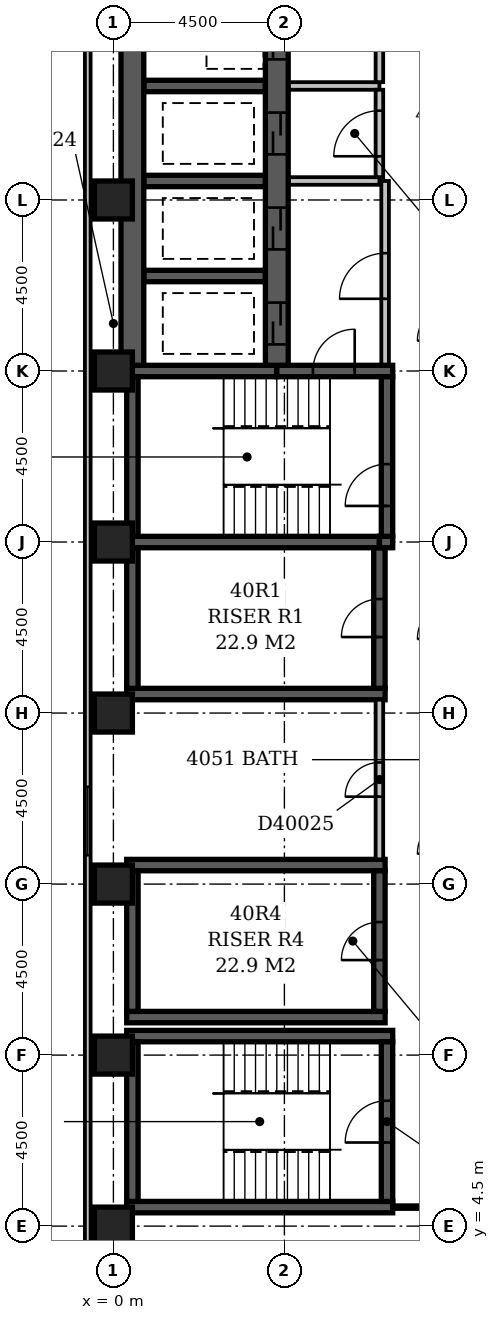
"""IFC4 building model, lengths in metres.
Left out: names, types, materials, properties, quantities, classifications, styles, units other than length and angle.
Written with IfcOpenShell. Run it as: python <this file> out.ifc"""

import sys

from ifc_helpers import new_model, si_unit, direction, frame, frame_2d, origin, origin_2d, place, context, subcontext, project, spatial, rectangle, extrude, element, fill, save


model = new_model("IFC4")
c1 = context("Model", 3, precision=1e-05, world=origin(), true_north=direction((0.0, 1.0)))
c2 = subcontext(c1, "Body", "Model", "MODEL_VIEW")
j1 = project(units=[si_unit("LENGTHUNIT", "METRE"), si_unit("PLANEANGLEUNIT", "RADIAN")], contexts=[c1])
p1 = place(None, origin())
s1 = spatial("IfcSite", under=j1, at=p1, CompositionType="ELEMENT")
p2 = place(p1, origin())
s2 = spatial("IfcBuilding", under=s1, at=p2, CompositionType="ELEMENT")
p3 = place(p2, frame((0.0, 0.0, 159.2)))
s3 = spatial("IfcBuildingStorey", under=s2, at=p3, CompositionType="ELEMENT", Elevation=159.2)
for number, where, z_axis, x_axis in (
    (1, (0.35, 5.0, -0.3), (0.0, 0.0, 1.0), (1.0, 0.0, 0.0)),
    (2, (0.35, 9.5, -0.3), (0.0, 0.0, 1.0), (1.0, 0.0, 0.0)),
):
    element("IfcWall", number, at=place(p3, frame(where, z_axis=z_axis, x_axis=x_axis)), inside=s3, PredefinedType="SHEAR", context=c2, shape_type="SweptSolid", body=[
        extrude(rectangle(XDim=7.0, YDim=0.3, at=frame_2d((3.5, 0.0))), origin(), (0.0, 0.0, 1.0), 3.6),
    ])
for number, where, z_axis, x_axis in (
    (3, (0.35, 10.0, -0.3), (0.0, 0.0, 1.0), (1.0, 0.0, 0.0)),
    (4, (0.35, 14.0, -0.3), (0.0, 0.0, 1.0), (1.0, 0.0, 0.0)),
    (5, (0.35, 18.5, -0.3), (0.0, 0.0, 1.0), (1.0, 0.0, 0.0)),
):
    element("IfcWall", number, at=place(p3, frame(where, z_axis=z_axis, x_axis=x_axis)), inside=s3, PredefinedType="SHEAR", context=c2, shape_type="SweptSolid", body=[
        extrude(rectangle(XDim=6.8, YDim=0.3, at=frame_2d((3.4, 0.0))), origin(), (0.0, 0.0, 1.0), 3.6),
    ])
p4 = place(p3, frame((0.35, 22.5, -0.3), z_axis=(0.0, 0.0, 1.0), x_axis=(1.0, 0.0, 0.0)))
e6 = element("IfcWall", 6, at=p4, inside=s3, PredefinedType="SHEAR", context=c2, shape_type="SweptSolid", body=[
    extrude(rectangle(XDim=6.65, YDim=0.3, at=frame_2d((3.325, 0.0))), origin(), (0.0, 0.0, 1.0), 3.6),
])
p5 = place(p3, frame((0.35, 27.0, -0.3), z_axis=(0.0, 0.0, 1.0), x_axis=(1.0, 0.0, 0.0)))
e7 = element("IfcWall", 7, at=p5, inside=s3, PredefinedType="SHEAR", context=c2, shape_type="SweptSolid", body=[
    extrude(rectangle(XDim=3.95, YDim=0.3, at=frame_2d((1.975, 0.0))), origin(), (0.0, 0.0, 1.0), 3.6),
])
p6 = place(p3, frame((0.5, 5.15, -0.3), z_axis=(0.0, 0.0, 1.0), x_axis=(0.0, 1.0, 0.0)))
e8 = element("IfcWall", 8, at=p6, inside=s3, PredefinedType="SHEAR", context=c2, shape_type="SweptSolid", body=[
    extrude(rectangle(XDim=4.2, YDim=0.3, at=frame_2d((2.1, 0.0))), origin(), (0.0, 0.0, 1.0), 3.6),
])
for number, where, z_axis, x_axis in (
    (9, (0.5, 10.15, -0.3), (0.0, 0.0, 1.0), (0.0, 1.0, 0.0)),
    (10, (0.5, 18.65, -0.3), (0.0, 0.0, 1.0), (0.0, 1.0, 0.0)),
):
    element("IfcWall", number, at=place(p3, frame(where, z_axis=z_axis, x_axis=x_axis)), inside=s3, PredefinedType="SHEAR", context=c2, shape_type="SweptSolid", body=[
        extrude(rectangle(XDim=3.7, YDim=0.3, at=frame_2d((1.85, 0.0))), origin(), (0.0, 0.0, 1.0), 3.6),
    ])
p7 = place(p3, frame((0.5, 22.65, -0.3), z_axis=(0.0, 0.0, 1.0), x_axis=(0.0, 1.0, 0.0)))
e11 = element("IfcWall", 11, at=p7, inside=s3, PredefinedType="SHEAR", context=c2, shape_type="SweptSolid", body=[
    extrude(rectangle(XDim=4.2, YDim=0.3, at=frame_2d((2.1, 0.0))), origin(), (0.0, 0.0, 1.0), 3.6),
])
p8 = place(p3, frame((0.5, 27.15, -0.3), z_axis=(0.0, 0.0, 1.0), x_axis=(0.0, 1.0, 0.0)))
e12 = element("IfcWall", 12, at=p8, inside=s3, PredefinedType="SHEAR", context=c2, shape_type="SweptSolid", body=[
    extrude(rectangle(XDim=22.05, YDim=0.6, at=frame_2d((11.025, 0.0))), origin(), (0.0, 0.0, 1.0), 3.6),
])
for number, where, z_axis, x_axis in (
    (13, (0.8, 29.5, -0.3), (0.0, 0.0, 1.0), (1.0, 0.0, 0.0)),
    (14, (0.8, 32.0, -0.3), (0.0, 0.0, 1.0), (1.0, 0.0, 0.0)),
    (15, (0.8, 34.5, -0.3), (0.0, 0.0, 1.0), (1.0, 0.0, 0.0)),
):
    element("IfcWall", number, at=place(p3, frame(where, z_axis=z_axis, x_axis=x_axis)), inside=s3, PredefinedType="SHEAR", context=c2, shape_type="SweptSolid", body=[
        extrude(rectangle(XDim=3.2, YDim=0.3, at=frame_2d((1.6, 0.0))), origin(), (0.0, 0.0, 1.0), 3.6),
    ])
p9 = place(p3, frame((4.3, 27.0, -0.3), z_axis=(0.0, 0.0, 1.0), x_axis=(1.0, 0.0, 0.0)))
e16 = element("IfcWall", 16, at=p9, inside=s3, PredefinedType="SHEAR", context=c2, shape_type="SweptSolid", body=[
    extrude(rectangle(XDim=3.05, YDim=0.3, at=frame_2d((1.525, 0.0))), origin(), (0.0, 0.0, 1.0), 3.6),
])
p10 = place(p9, frame((0.95, 0.0, 0.3)))
e17 = element("IfcOpeningElement", 17, at=p10, cuts=e16, PredefinedType="OPENING", context=c2, shape_type="SweptSolid", body=[
    extrude(rectangle(XDim=1.1, YDim=2.1, at=frame_2d((0.55, 1.05))), frame((0.0, 0.162, 0.0), z_axis=(0.0, -1.0, 0.0), x_axis=(1.0, 0.0, 0.0)), (0.0, 0.0, 1.0), 0.324),
])
p11 = place(p3, frame((4.3, 27.15, -0.3), z_axis=(0.0, 0.0, 1.0), x_axis=(0.0, 1.0, 0.0)))
e18 = element("IfcWall", 18, at=p11, inside=s3, PredefinedType="SHEAR", context=c2, shape_type="SweptSolid", body=[
    extrude(rectangle(XDim=22.05, YDim=0.6, at=frame_2d((11.025, 0.0))), origin(), (0.0, 0.0, 1.0), 3.6),
])
p12 = place(p11, frame((3.05, 0.0, 0.3)))
e19 = element("IfcOpeningElement", 19, at=p12, cuts=e18, PredefinedType="OPENING", context=c2, shape_type="SweptSolid", body=[
    extrude(rectangle(XDim=1.1, YDim=2.1, at=frame_2d((0.55, 1.05))), frame((0.0, 0.312, 0.0), z_axis=(0.0, -1.0, 0.0), x_axis=(1.0, 0.0, 0.0)), (0.0, 0.0, 1.0), 0.624),
])
p13 = place(p11, frame((0.55, 0.0, 0.3)))
e20 = element("IfcOpeningElement", 20, at=p13, cuts=e18, PredefinedType="OPENING", context=c2, shape_type="SweptSolid", body=[
    extrude(rectangle(XDim=1.1, YDim=2.1, at=frame_2d((0.55, 1.05))), frame((0.0, 0.312, 0.0), z_axis=(0.0, -1.0, 0.0), x_axis=(1.0, 0.0, 0.0)), (0.0, 0.0, 1.0), 0.624),
])
p14 = place(p11, frame((20.55, 0.0, 0.3)))
e21 = element("IfcOpeningElement", 21, at=p14, cuts=e18, PredefinedType="OPENING", context=c2, shape_type="SweptSolid", body=[
    extrude(rectangle(XDim=1.1, YDim=2.1, at=frame_2d((0.55, 1.05))), frame((0.0, 0.312, 0.0), z_axis=(0.0, -1.0, 0.0), x_axis=(1.0, 0.0, 0.0)), (0.0, 0.0, 1.0), 0.624),
])
p15 = place(p11, frame((18.05, 0.0, 0.3)))
e22 = element("IfcOpeningElement", 22, at=p15, cuts=e18, PredefinedType="OPENING", context=c2, shape_type="SweptSolid", body=[
    extrude(rectangle(XDim=1.1, YDim=2.1, at=frame_2d((0.55, 1.05))), frame((0.0, 0.312, 0.0), z_axis=(0.0, -1.0, 0.0), x_axis=(1.0, 0.0, 0.0)), (0.0, 0.0, 1.0), 0.624),
])
p16 = place(p11, frame((15.55, 0.0, 0.3)))
e23 = element("IfcOpeningElement", 23, at=p16, cuts=e18, PredefinedType="OPENING", context=c2, shape_type="SweptSolid", body=[
    extrude(rectangle(XDim=1.1, YDim=2.1, at=frame_2d((0.55, 1.05))), frame((0.0, 0.312, 0.0), z_axis=(0.0, -1.0, 0.0), x_axis=(1.0, 0.0, 0.0)), (0.0, 0.0, 1.0), 0.624),
])
p17 = place(p11, frame((13.05, 0.0, 0.3)))
e24 = element("IfcOpeningElement", 24, at=p17, cuts=e18, PredefinedType="OPENING", context=c2, shape_type="SweptSolid", body=[
    extrude(rectangle(XDim=1.1, YDim=2.1, at=frame_2d((0.55, 1.05))), frame((0.0, 0.312, 0.0), z_axis=(0.0, -1.0, 0.0), x_axis=(1.0, 0.0, 0.0)), (0.0, 0.0, 1.0), 0.624),
])
p18 = place(p11, frame((10.55, 0.0, 0.3)))
e25 = element("IfcOpeningElement", 25, at=p18, cuts=e18, PredefinedType="OPENING", context=c2, shape_type="SweptSolid", body=[
    extrude(rectangle(XDim=1.1, YDim=2.1, at=frame_2d((0.55, 1.05))), frame((0.0, 0.312, 0.0), z_axis=(0.0, -1.0, 0.0), x_axis=(1.0, 0.0, 0.0)), (0.0, 0.0, 1.0), 0.624),
])
p19 = place(p11, frame((8.05, 0.0, 0.3)))
e26 = element("IfcOpeningElement", 26, at=p19, cuts=e18, PredefinedType="OPENING", context=c2, shape_type="SweptSolid", body=[
    extrude(rectangle(XDim=1.1, YDim=2.1, at=frame_2d((0.55, 1.05))), frame((0.0, 0.312, 0.0), z_axis=(0.0, -1.0, 0.0), x_axis=(1.0, 0.0, 0.0)), (0.0, 0.0, 1.0), 0.624),
])
p20 = place(p11, frame((5.55, 0.0, 0.3)))
e27 = element("IfcOpeningElement", 27, at=p20, cuts=e18, PredefinedType="OPENING", context=c2, shape_type="SweptSolid", body=[
    extrude(rectangle(XDim=1.1, YDim=2.1, at=frame_2d((0.55, 1.05))), frame((0.0, 0.312, 0.0), z_axis=(0.0, -1.0, 0.0), x_axis=(1.0, 0.0, 0.0)), (0.0, 0.0, 1.0), 0.624),
])
p21 = place(p3, frame((7.0, 10.15, -0.3), z_axis=(0.0, 0.0, 1.0), x_axis=(0.0, 1.0, 0.0)))
e28 = element("IfcWall", 28, at=p21, inside=s3, PredefinedType="SHEAR", context=c2, shape_type="SweptSolid", body=[
    extrude(rectangle(XDim=3.7, YDim=0.3, at=frame_2d((1.85, 0.0))), origin(), (0.0, 0.0, 1.0), 3.6),
])
p22 = place(p21, frame((1.35, 0.0, 0.3)))
e29 = element("IfcOpeningElement", 29, at=p22, cuts=e28, PredefinedType="OPENING", context=c2, shape_type="SweptSolid", body=[
    extrude(rectangle(XDim=1.0, YDim=2.1, at=frame_2d((0.5, 1.05))), frame((0.0, 0.162, 0.0), z_axis=(0.0, -1.0, 0.0), x_axis=(1.0, 0.0, 0.0)), (0.0, 0.0, 1.0), 0.324),
])
p23 = place(p3, frame((7.0, 18.65, -0.3), z_axis=(0.0, 0.0, 1.0), x_axis=(0.0, 1.0, 0.0)))
e30 = element("IfcWall", 30, at=p23, inside=s3, PredefinedType="SHEAR", context=c2, shape_type="SweptSolid", body=[
    extrude(rectangle(XDim=3.7, YDim=0.3, at=frame_2d((1.85, 0.0))), origin(), (0.0, 0.0, 1.0), 3.6),
])
p24 = place(p23, frame((1.35, 0.0, 0.3)))
e31 = element("IfcOpeningElement", 31, at=p24, cuts=e30, PredefinedType="OPENING", context=c2, shape_type="SweptSolid", body=[
    extrude(rectangle(XDim=1.0, YDim=2.1, at=frame_2d((0.5, 1.05))), frame((0.0, 0.162, 0.0), z_axis=(0.0, -1.0, 0.0), x_axis=(1.0, 0.0, 0.0)), (0.0, 0.0, 1.0), 0.324),
])
p25 = place(p3, frame((7.0, 22.5, -0.3), z_axis=(0.0, 0.0, 1.0), x_axis=(1.0, 0.0, 0.0)))
e32 = element("IfcWall", 32, at=p25, inside=s3, PredefinedType="SHEAR", context=c2, shape_type="SweptSolid", body=[
    extrude(rectangle(XDim=0.35, YDim=0.3, at=frame_2d((0.175, 0.0))), origin(), (0.0, 0.0, 1.0), 3.6),
])
p26 = place(p3, frame((7.2, 5.15, -0.3), z_axis=(0.0, 0.0, 1.0), x_axis=(0.0, 1.0, 0.0)))
e33 = element("IfcWall", 33, at=p26, inside=s3, PredefinedType="SHEAR", context=c2, shape_type="SweptSolid", body=[
    extrude(rectangle(XDim=4.2, YDim=0.3, at=frame_2d((2.1, 0.0))), origin(), (0.0, 0.0, 1.0), 3.6),
])
p27 = place(p26, frame((1.55, 0.0, 0.3)))
e34 = element("IfcOpeningElement", 34, at=p27, cuts=e33, PredefinedType="OPENING", context=c2, shape_type="SweptSolid", body=[
    extrude(rectangle(XDim=1.1, YDim=2.1, at=frame_2d((0.55, 1.05))), frame((0.0, 0.162, 0.0), z_axis=(0.0, -1.0, 0.0), x_axis=(1.0, 0.0, 0.0)), (0.0, 0.0, 1.0), 0.324),
])
p28 = place(p3, frame((7.2, 22.65, -0.3), z_axis=(0.0, 0.0, 1.0), x_axis=(0.0, 1.0, 0.0)))
e35 = element("IfcWall", 35, at=p28, inside=s3, PredefinedType="SHEAR", context=c2, shape_type="SweptSolid", body=[
    extrude(rectangle(XDim=4.2, YDim=0.3, at=frame_2d((2.1, 0.0))), origin(), (0.0, 0.0, 1.0), 3.6),
])
p29 = place(p28, frame((0.8, 0.0, 0.3)))
e36 = element("IfcOpeningElement", 36, at=p29, cuts=e35, PredefinedType="OPENING", context=c2, shape_type="SweptSolid", body=[
    extrude(rectangle(XDim=1.1, YDim=2.1, at=frame_2d((0.55, 1.05))), frame((0.0, 0.162, 0.0), z_axis=(0.0, -1.0, 0.0), x_axis=(1.0, 0.0, 0.0)), (0.0, 0.0, 1.0), 0.324),
])
for number, where, z_axis, x_axis in (
    (37, (0.0, 4.5, -0.3), (0.0, 0.0, 1.0), (1.0, 0.0, 0.0)),
    (38, (0.0, 9.0, -0.3), (0.0, 0.0, 1.0), (1.0, 0.0, 0.0)),
    (39, (0.0, 13.5, -0.3), (0.0, 0.0, 1.0), (1.0, 0.0, 0.0)),
    (40, (0.0, 18.0, -0.3), (0.0, 0.0, 1.0), (1.0, 0.0, 0.0)),
    (41, (0.0, 22.5, -0.3), (0.0, 0.0, 1.0), (1.0, 0.0, 0.0)),
    (42, (0.0, 27.0, -0.3), (0.0, 0.0, 1.0), (1.0, 0.0, 0.0)),
    (43, (0.0, 31.5, -0.3), (0.0, 0.0, 1.0), (1.0, 0.0, 0.0)),
):
    element("IfcColumn", number, at=place(p3, frame(where, z_axis=z_axis, x_axis=x_axis)), inside=s3, PredefinedType="COLUMN", context=c2, shape_type="SweptSolid", body=[
        extrude(rectangle(XDim=1.0, YDim=1.0, at=origin_2d()), origin(), (0.0, 0.0, 1.0), 3.6),
    ])
p30 = place(p3, frame((-0.675, 59.1, 0.0), z_axis=(0.0, 0.0, 1.0), x_axis=(0.0, -1.0, 0.0)))
e44 = element("IfcWall", 44, at=p30, inside=s3, PredefinedType="STANDARD", context=c2, shape_type="SweptSolid", body=[
    extrude(rectangle(XDim=55.35, YDim=0.15, at=frame_2d((27.675, 0.0))), origin(), (0.0, 0.0, 1.0), 2.7),
])
p31 = place(p30, frame((43.04, 0.0, 0.6)))
e45 = element("IfcOpeningElement", 45, at=p31, cuts=e44, PredefinedType="OPENING", context=c2, shape_type="SweptSolid", body=[
    extrude(rectangle(XDim=1.8, YDim=1.8, at=frame_2d((0.9, 0.9))), frame((0.0, 0.087, 0.0), z_axis=(0.0, -1.0, 0.0), x_axis=(1.0, 0.0, 0.0)), (0.0, 0.0, 1.0), 0.174),
])
p32 = place(p3, frame((4.62, 34.5, 0.0), z_axis=(0.0, 0.0, 1.0), x_axis=(1.0, 0.0, 0.0)))
e46 = element("IfcWall", 46, at=p32, inside=s3, PredefinedType="PARTITIONING", context=c2, shape_type="SweptSolid", body=[
    extrude(rectangle(XDim=2.38, YDim=0.2, at=frame_2d((1.19, 0.0))), origin(), (0.0, 0.0, 1.0), 3.3),
])
p33 = place(p3, frame((7.0, 34.6, 0.0), z_axis=(0.0, 0.0, 1.0), x_axis=(0.0, 1.0, 0.0)))
e47 = element("IfcWall", 47, at=p33, inside=s3, PredefinedType="PARTITIONING", context=c2, shape_type="SweptSolid", body=[
    extrude(rectangle(XDim=14.9, YDim=0.2, at=frame_2d((7.45, 0.0))), origin(), (0.0, 0.0, 1.0), 3.3),
])
p34 = place(p33, frame((2.8, 0.0, 0.0)))
e48 = element("IfcOpeningElement", 48, at=p34, cuts=e47, PredefinedType="OPENING", context=c2, shape_type="SweptSolid", body=[
    extrude(rectangle(XDim=1.2, YDim=2.1, at=frame_2d((0.6, 1.05))), frame((0.0, 0.112, 0.0), z_axis=(0.0, -1.0, 0.0), x_axis=(1.0, 0.0, 0.0)), (0.0, 0.0, 1.0), 0.224),
])
p35 = place(p33, frame((9.8, 0.0, 0.0)))
e49 = element("IfcOpeningElement", 49, at=p35, cuts=e47, PredefinedType="OPENING", context=c2, shape_type="SweptSolid", body=[
    extrude(rectangle(XDim=1.2, YDim=2.1, at=frame_2d((0.6, 1.05))), frame((0.0, 0.112, 0.0), z_axis=(0.0, -1.0, 0.0), x_axis=(1.0, 0.0, 0.0)), (0.0, 0.0, 1.0), 0.224),
])
p36 = place(p3, frame((4.62, 32.0, 0.0), z_axis=(0.0, 0.0, 1.0), x_axis=(1.0, 0.0, 0.0)))
e50 = element("IfcWall", 50, at=p36, inside=s3, PredefinedType="PARTITIONING", context=c2, shape_type="SweptSolid", body=[
    extrude(rectangle(XDim=2.38, YDim=0.2, at=frame_2d((1.19, 0.0))), origin(), (0.0, 0.0, 1.0), 3.3),
])
p37 = place(p3, frame((7.0, 32.1, 0.0), z_axis=(0.0, 0.0, 1.0), x_axis=(0.0, 1.0, 0.0)))
e51 = element("IfcWall", 51, at=p37, inside=s3, PredefinedType="PARTITIONING", context=c2, shape_type="SweptSolid", body=[
    extrude(rectangle(XDim=2.3, YDim=0.2, at=frame_2d((1.15, 0.0))), origin(), (0.0, 0.0, 1.0), 3.3),
])
p38 = place(p37, frame((0.55, 0.0, 0.0)))
e52 = element("IfcOpeningElement", 52, at=p38, cuts=e51, PredefinedType="OPENING", context=c2, shape_type="SweptSolid", body=[
    extrude(rectangle(XDim=1.2, YDim=2.1, at=frame_2d((0.6, 1.05))), frame((0.0, 0.112, 0.0), z_axis=(0.0, -1.0, 0.0), x_axis=(1.0, 0.0, 0.0)), (0.0, 0.0, 1.0), 0.224),
])
p39 = place(p3, frame((7.15, 27.17, 0.0), z_axis=(0.0, 0.0, 1.0), x_axis=(0.0, 1.0, 0.0)))
e53 = element("IfcWall", 53, at=p39, inside=s3, PredefinedType="PARTITIONING", context=c2, shape_type="SweptSolid", body=[
    extrude(rectangle(XDim=4.83, YDim=0.2, at=frame_2d((2.415, 0.0))), origin(), (0.0, 0.0, 1.0), 3.3),
])
p40 = place(p39, frame((1.73, 0.0, 0.0)))
e54 = element("IfcOpeningElement", 54, at=p40, cuts=e53, PredefinedType="OPENING", context=c2, shape_type="SweptSolid", body=[
    extrude(rectangle(XDim=1.2, YDim=2.1, at=frame_2d((0.6, 1.05))), frame((0.0, 0.112, 0.0), z_axis=(0.0, -1.0, 0.0), x_axis=(1.0, 0.0, 0.0)), (0.0, 0.0, 1.0), 0.224),
])
p41 = place(p3, frame((0.0, 4.5, 0.0), z_axis=(0.0, 0.0, 1.0), x_axis=(0.0, 1.0, 0.0)))
e55 = element("IfcWall", 55, at=p41, inside=s3, PredefinedType="PARTITIONING", context=c2, shape_type="SweptSolid", body=[
    extrude(rectangle(XDim=0.5, YDim=0.1, at=frame_2d((0.25, 0.0))), origin(), (0.0, 0.0, 1.0), 2.7),
])
p42 = place(p3, frame((7.349, 5.0, 0.0), z_axis=(0.0, 0.0, 1.0), x_axis=(1.0, 0.0, 0.0)))
e56 = element("IfcWall", 56, at=p42, inside=s3, PredefinedType="PARTITIONING", context=c2, shape_type="SweptSolid", body=[
    extrude(rectangle(XDim=1.551, YDim=0.1, at=frame_2d((0.775, 0.0))), origin(), (0.0, 0.0, 1.0), 3.3),
])
p43 = place(p3, frame((7.0, 14.15, 0.0), z_axis=(0.0, 0.0, 1.0), x_axis=(0.0, 1.0, 0.0)))
e57 = element("IfcWall", 57, at=p43, inside=s3, PredefinedType="PARTITIONING", context=c2, shape_type="SweptSolid", body=[
    extrude(rectangle(XDim=4.2, YDim=0.2, at=frame_2d((2.1, 0.0))), origin(), (0.0, 0.0, 1.0), 3.3),
])
p44 = place(p43, frame((1.65, 0.0, 0.0)))
e58 = element("IfcOpeningElement", 58, at=p44, cuts=e57, PredefinedType="OPENING", context=c2, shape_type="SweptSolid", body=[
    extrude(rectangle(XDim=0.9, YDim=2.1, at=frame_2d((0.45, 1.05))), frame((0.0, 0.112, 0.0), z_axis=(0.0, -1.0, 0.0), x_axis=(1.0, 0.0, 0.0)), (0.0, 0.0, 1.0), 0.224),
])
p45 = place(p31, origin())
e59 = element("IfcWindow", 59, at=p45, inside=s3, PartitioningType="SINGLE_PANEL", PredefinedType="WINDOW", context=c2, shape_type="SweptSolid", body=[
    extrude(rectangle(XDim=1.8, YDim=1.8, at=frame_2d((0.9, 0.9))), frame((0.0, 0.03, 0.0), z_axis=(0.0, -1.0, 0.0), x_axis=(1.0, 0.0, 0.0)), (0.0, 0.0, 1.0), 0.06),
])
fill(e45, e59)
p46 = place(p40, origin())
e60 = element("IfcDoor", 60, at=p46, inside=s3, OperationType="SINGLE_SWING_LEFT", PredefinedType="DOOR", context=c2, shape_type="SweptSolid", body=[
    extrude(rectangle(XDim=1.2, YDim=2.1, at=frame_2d((0.6, 1.05))), frame((0.0, 0.025, 0.0), z_axis=(0.0, -1.0, 0.0), x_axis=(1.0, 0.0, 0.0)), (0.0, 0.0, 1.0), 0.05),
])
fill(e54, e60)
p47 = place(p12, origin())
e61 = element("IfcDoor", 61, at=p47, inside=s3, OperationType="SLIDING_TO_LEFT", PredefinedType="DOOR", context=c2, shape_type="SweptSolid", body=[
    extrude(rectangle(XDim=1.1, YDim=2.1, at=frame_2d((0.55, 1.05))), frame((0.0, 0.025, 0.0), z_axis=(0.0, -1.0, 0.0), x_axis=(1.0, 0.0, 0.0)), (0.0, 0.0, 1.0), 0.05),
])
fill(e19, e61)
p48 = place(p13, origin())
e62 = element("IfcDoor", 62, at=p48, inside=s3, OperationType="SLIDING_TO_LEFT", PredefinedType="DOOR", context=c2, shape_type="SweptSolid", body=[
    extrude(rectangle(XDim=1.1, YDim=2.1, at=frame_2d((0.55, 1.05))), frame((0.0, 0.025, 0.0), z_axis=(0.0, -1.0, 0.0), x_axis=(1.0, 0.0, 0.0)), (0.0, 0.0, 1.0), 0.05),
])
fill(e20, e62)
p49 = place(p19, origin())
e63 = element("IfcDoor", 63, at=p49, inside=s3, OperationType="SLIDING_TO_LEFT", PredefinedType="DOOR", context=c2, shape_type="SweptSolid", body=[
    extrude(rectangle(XDim=1.1, YDim=2.1, at=frame_2d((0.55, 1.05))), frame((0.0, 0.025, 0.0), z_axis=(0.0, -1.0, 0.0), x_axis=(1.0, 0.0, 0.0)), (0.0, 0.0, 1.0), 0.05),
])
fill(e26, e63)
p50 = place(p38, origin())
e64 = element("IfcDoor", 64, at=p50, inside=s3, OperationType="SINGLE_SWING_LEFT", PredefinedType="DOOR", context=c2, shape_type="SweptSolid", body=[
    extrude(rectangle(XDim=1.2, YDim=2.1, at=frame_2d((0.6, 1.05))), frame((0.0, 0.025, 0.0), z_axis=(0.0, -1.0, 0.0), x_axis=(1.0, 0.0, 0.0)), (0.0, 0.0, 1.0), 0.05),
])
fill(e52, e64)
p51 = place(p20, origin())
e65 = element("IfcDoor", 65, at=p51, inside=s3, OperationType="SLIDING_TO_LEFT", PredefinedType="DOOR", context=c2, shape_type="SweptSolid", body=[
    extrude(rectangle(XDim=1.1, YDim=2.1, at=frame_2d((0.55, 1.05))), frame((0.0, 0.025, 0.0), z_axis=(0.0, -1.0, 0.0), x_axis=(1.0, 0.0, 0.0)), (0.0, 0.0, 1.0), 0.05),
])
fill(e27, e65)
p52 = place(p24, origin())
e66 = element("IfcDoor", 66, at=p52, inside=s3, OperationType="SINGLE_SWING_LEFT", PredefinedType="DOOR", context=c2, shape_type="SweptSolid", body=[
    extrude(rectangle(XDim=1.0, YDim=2.1, at=frame_2d((0.5, 1.05))), frame((0.0, 0.025, 0.0), z_axis=(0.0, -1.0, 0.0), x_axis=(1.0, 0.0, 0.0)), (0.0, 0.0, 1.0), 0.05),
])
fill(e31, e66)
p53 = place(p22, origin())
e67 = element("IfcDoor", 67, at=p53, inside=s3, OperationType="SINGLE_SWING_LEFT", PredefinedType="DOOR", context=c2, shape_type="SweptSolid", body=[
    extrude(rectangle(XDim=1.0, YDim=2.1, at=frame_2d((0.5, 1.05))), frame((0.0, 0.025, 0.0), z_axis=(0.0, -1.0, 0.0), x_axis=(1.0, 0.0, 0.0)), (0.0, 0.0, 1.0), 0.05),
])
fill(e29, e67)
p54 = place(p10, frame((1.1, 0.0, 0.0), z_axis=(0.0, 0.0, 1.0), x_axis=(-1.0, 0.0, 0.0)))
e68 = element("IfcDoor", 68, at=p54, inside=s3, OperationType="SINGLE_SWING_LEFT", PredefinedType="DOOR", context=c2, shape_type="SweptSolid", body=[
    extrude(rectangle(XDim=1.1, YDim=2.1, at=frame_2d((0.55, 1.05))), frame((0.0, 0.025, 0.0), z_axis=(0.0, -1.0, 0.0), x_axis=(1.0, 0.0, 0.0)), (0.0, 0.0, 1.0), 0.05),
])
fill(e17, e68)
p55 = place(p29, origin())
e69 = element("IfcDoor", 69, at=p55, inside=s3, OperationType="SINGLE_SWING_LEFT", PredefinedType="DOOR", context=c2, shape_type="SweptSolid", body=[
    extrude(rectangle(XDim=1.1, YDim=2.1, at=frame_2d((0.55, 1.05))), frame((0.0, 0.025, 0.0), z_axis=(0.0, -1.0, 0.0), x_axis=(1.0, 0.0, 0.0)), (0.0, 0.0, 1.0), 0.05),
])
fill(e36, e69)
p56 = place(p27, origin())
e70 = element("IfcDoor", 70, at=p56, inside=s3, OperationType="SINGLE_SWING_LEFT", PredefinedType="DOOR", context=c2, shape_type="SweptSolid", body=[
    extrude(rectangle(XDim=1.1, YDim=2.1, at=frame_2d((0.55, 1.05))), frame((0.0, 0.025, 0.0), z_axis=(0.0, -1.0, 0.0), x_axis=(1.0, 0.0, 0.0)), (0.0, 0.0, 1.0), 0.05),
])
fill(e34, e70)
p57 = place(p44, origin())
e71 = element("IfcDoor", 71, at=p57, inside=s3, OperationType="SINGLE_SWING_LEFT", PredefinedType="DOOR", context=c2, shape_type="SweptSolid", body=[
    extrude(rectangle(XDim=0.9, YDim=2.1, at=frame_2d((0.45, 1.05))), frame((0.0, 0.025, 0.0), z_axis=(0.0, -1.0, 0.0), x_axis=(1.0, 0.0, 0.0)), (0.0, 0.0, 1.0), 0.05),
])
fill(e58, e71)
save(model, sys.argv[1])
